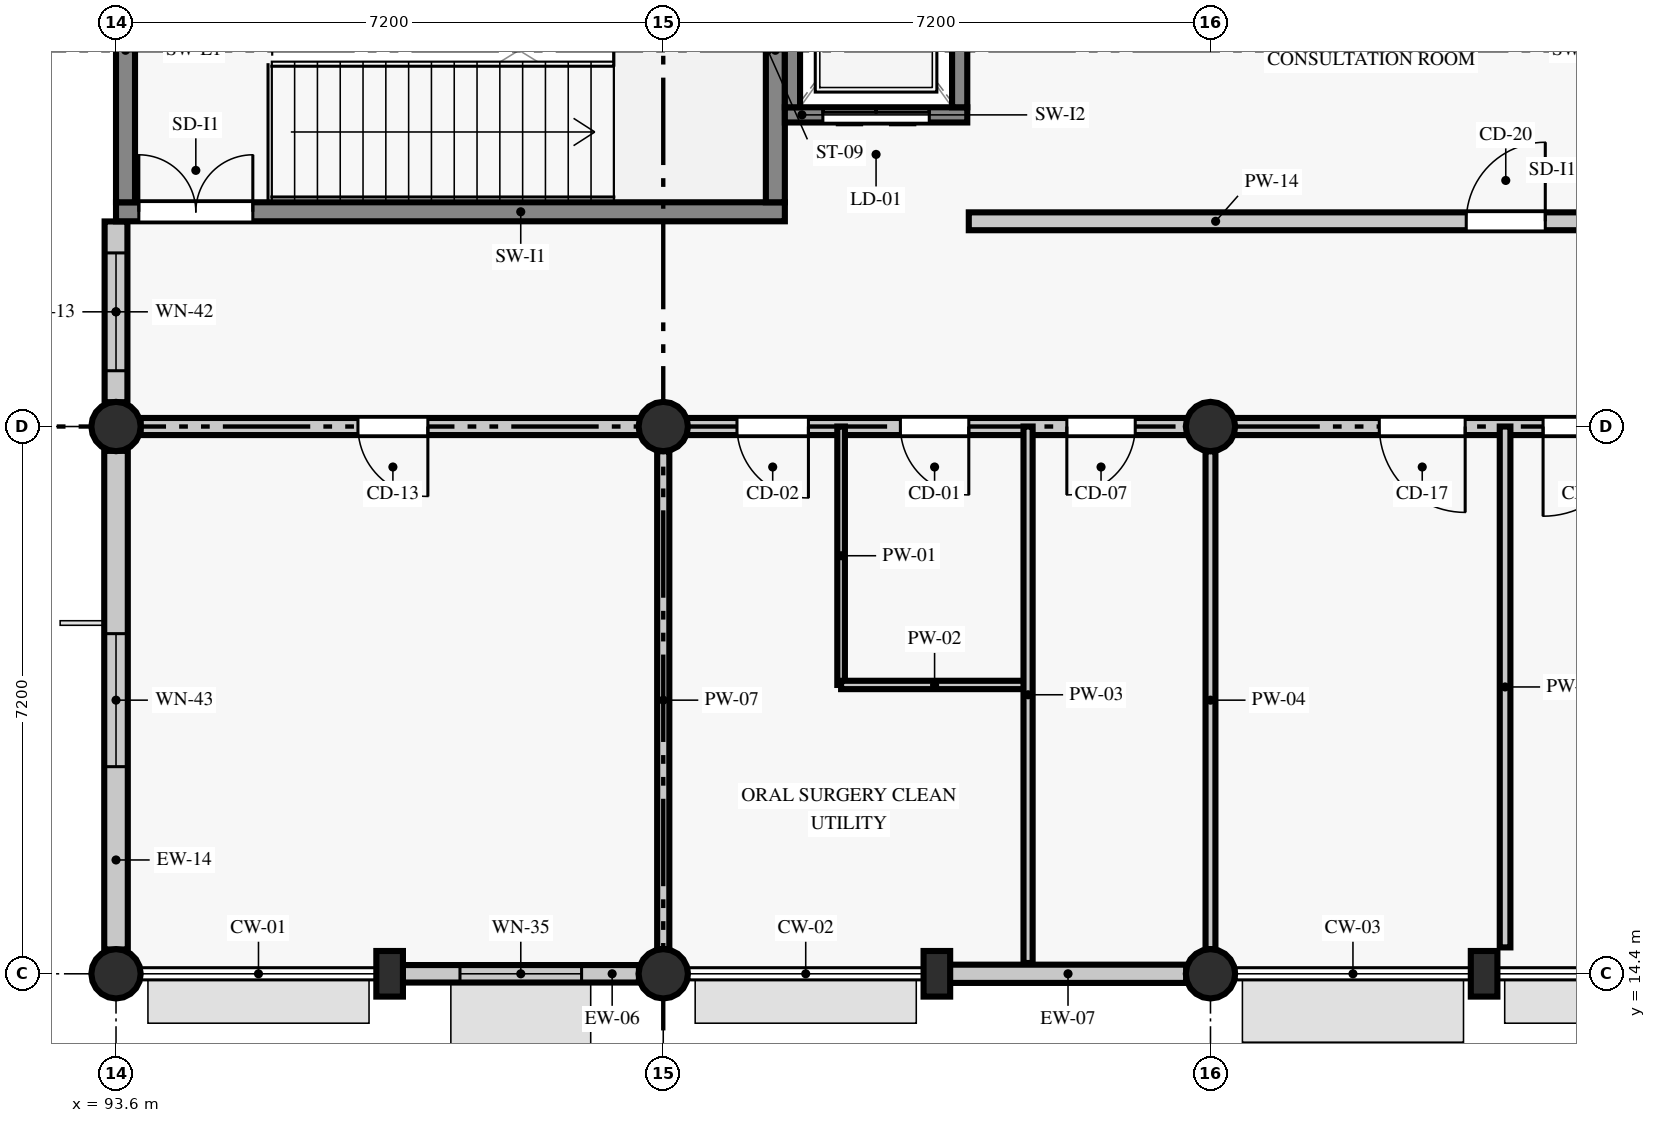
"""IFC4 building model, lengths in metres.
Left out: names, types, materials, properties, quantities, classifications, styles, units other than length and angle.
Written with IfcOpenShell. Run it as: python <this file> out.ifc"""

import sys

from ifc_helpers import new_model, si_unit, direction, frame, frame_2d, origin, origin_2d, place, context, subcontext, project, spatial, rectangle, circle, extrude, element, fill, save


model = new_model("IFC4")
c1 = context("Model", 3, precision=1e-05, world=origin(), true_north=direction((0.0, 1.0)))
c2 = subcontext(c1, "Body", "Model", "MODEL_VIEW")
j1 = project(units=[si_unit("LENGTHUNIT", "METRE"), si_unit("PLANEANGLEUNIT", "RADIAN")], contexts=[c1])
p1 = place(None, origin())
s1 = spatial("IfcSite", under=j1, at=p1, CompositionType="ELEMENT")
p2 = place(p1, origin())
s2 = spatial("IfcBuilding", under=s1, at=p2, CompositionType="ELEMENT")
p3 = place(p2, frame((0.0, 0.0, 4.8)))
s3 = spatial("IfcBuildingStorey", under=s2, at=p3, CompositionType="ELEMENT", Elevation=4.8)
for number, where, z_axis, x_axis in (
    (1, (93.6, 14.4, 0.0), (0.0, 0.0, 1.0), (1.0, 0.0, 0.0)),
    (2, (93.6, 21.6, 0.0), (0.0, 0.0, 1.0), (1.0, 0.0, 0.0)),
    (3, (100.8, 14.4, 0.0), (0.0, 0.0, 1.0), (1.0, 0.0, 0.0)),
    (4, (100.8, 21.6, 0.0), (0.0, 0.0, 1.0), (1.0, 0.0, 0.0)),
    (5, (108.0, 14.4, 0.0), (0.0, 0.0, 1.0), (1.0, 0.0, 0.0)),
    (6, (108.0, 21.6, 0.0), (0.0, 0.0, 1.0), (1.0, 0.0, 0.0)),
):
    element("IfcColumn", number, at=place(p3, frame(where, z_axis=z_axis, x_axis=x_axis)), inside=s3, PredefinedType="COLUMN", context=c2, shape_type="SweptSolid", body=[
        extrude(circle(Radius=0.325, at=origin_2d()), origin(), (0.0, 0.0, 1.0), 4.49),
    ])
for number, where, z_axis, x_axis in (
    (7, (97.2, 14.4, 0.0), (0.0, 0.0, 1.0), (1.0, 0.0, 0.0)),
    (8, (104.4, 14.4, 0.0), (0.0, 0.0, 1.0), (1.0, 0.0, 0.0)),
    (9, (111.6, 14.4, 0.0), (0.0, 0.0, 1.0), (1.0, 0.0, 0.0)),
):
    element("IfcColumn", number, at=place(p3, frame(where, z_axis=z_axis, x_axis=x_axis)), inside=s3, PredefinedType="PILASTER", context=c2, shape_type="SweptSolid", body=[
        extrude(rectangle(XDim=0.35, YDim=0.6, at=origin_2d()), origin(), (0.0, 0.0, 1.0), 4.49),
    ])
p4 = place(p3, frame((97.371, 14.4, 0.0), z_axis=(0.0, 0.0, 1.0), x_axis=(1.0, 0.0, 0.0)))
e10 = element("IfcWall", 10, at=p4, inside=s3, PredefinedType="STANDARD", context=c2, shape_type="SweptSolid", body=[
    extrude(rectangle(XDim=3.109, YDim=0.23, at=frame_2d((1.554, 0.0))), origin(), (0.0, 0.0, 1.0), 3.84),
])
p5 = place(p4, frame((0.754, 0.0, 0.9)))
e11 = element("IfcOpeningElement", 11, at=p5, cuts=e10, PredefinedType="OPENING", context=c2, shape_type="SweptSolid", body=[
    extrude(rectangle(XDim=1.6, YDim=1.66, at=frame_2d((0.8, 0.83))), frame((0.0, 0.125, 0.0), z_axis=(0.0, -1.0, 0.0), x_axis=(1.0, 0.0, 0.0)), (0.0, 0.0, 1.0), 0.25),
])
p6 = place(p3, frame((104.571, 14.4, 0.0), z_axis=(0.0, 0.0, 1.0), x_axis=(1.0, 0.0, 0.0)))
e12 = element("IfcWall", 12, at=p6, inside=s3, PredefinedType="STANDARD", context=c2, shape_type="SweptSolid", body=[
    extrude(rectangle(XDim=3.109, YDim=0.24, at=frame_2d((1.554, 0.0))), origin(), (0.0, 0.0, 1.0), 3.84),
])
p7 = place(p3, frame((93.6, 24.298, 0.0), z_axis=(0.0, 0.0, 1.0), x_axis=(0.0, -1.0, 0.0)))
e13 = element("IfcWall", 13, at=p7, inside=s3, PredefinedType="STANDARD", context=c2, shape_type="SweptSolid", body=[
    extrude(rectangle(XDim=2.378, YDim=0.3, at=frame_2d((1.189, 0.0))), origin(), (0.0, 0.0, 1.0), 4.49),
])
p8 = place(p7, frame((0.414, 0.0, 0.9)))
e14 = element("IfcOpeningElement", 14, at=p8, cuts=e13, PredefinedType="OPENING", context=c2, shape_type="SweptSolid", body=[
    extrude(rectangle(XDim=1.55, YDim=1.78, at=frame_2d((0.775, 0.89))), frame((0.0, 0.16, 0.0), z_axis=(0.0, -1.0, 0.0), x_axis=(1.0, 0.0, 0.0)), (0.0, 0.0, 1.0), 0.32),
])
p9 = place(p3, frame((93.6, 21.28, 0.0), z_axis=(0.0, 0.0, 1.0), x_axis=(0.0, -1.0, 0.0)))
e15 = element("IfcWall", 15, at=p9, inside=s3, PredefinedType="STANDARD", context=c2, shape_type="SweptSolid", body=[
    extrude(rectangle(XDim=6.56, YDim=0.31, at=frame_2d((3.28, 0.0))), origin(), (0.0, 0.0, 1.0), 3.84),
])
p10 = place(p9, frame((2.405, 0.0, 0.9)))
e16 = element("IfcOpeningElement", 16, at=p10, cuts=e15, PredefinedType="OPENING", context=c2, shape_type="SweptSolid", body=[
    extrude(rectangle(XDim=1.75, YDim=1.78, at=frame_2d((0.875, 0.89))), frame((0.0, 0.165, 0.0), z_axis=(0.0, -1.0, 0.0), x_axis=(1.0, 0.0, 0.0)), (0.0, 0.0, 1.0), 0.33),
])
p11 = place(p3, frame((93.6, 24.425, 0.0), z_axis=(0.0, 0.0, 1.0), x_axis=(1.0, 0.0, 0.0)))
e17 = element("IfcWall", 17, at=p11, inside=s3, PredefinedType="SHEAR", context=c2, shape_type="SweptSolid", body=[
    extrude(rectangle(XDim=8.8, YDim=0.25, at=frame_2d((4.4, 0.0))), origin(), (0.0, 0.0, 1.0), 4.49),
])
p12 = place(p11, frame((0.3, 0.0, 0.0)))
e18 = element("IfcOpeningElement", 18, at=p12, cuts=e17, PredefinedType="OPENING", context=c2, shape_type="SweptSolid", body=[
    extrude(rectangle(XDim=1.5, YDim=2.15, at=frame_2d((0.75, 1.075))), frame((0.0, 0.135, 0.0), z_axis=(0.0, -1.0, 0.0), x_axis=(1.0, 0.0, 0.0)), (0.0, 0.0, 1.0), 0.27),
])
for number, where, z_axis, x_axis in (
    (19, (102.275, 24.55, 0.0), (0.0, 0.0, 1.0), (0.0, 1.0, 0.0)),
    (20, (93.725, 28.55, 0.0), (0.0, 0.0, 1.0), (0.0, -1.0, 0.0)),
):
    element("IfcWall", number, at=place(p3, frame(where, z_axis=z_axis, x_axis=x_axis)), inside=s3, PredefinedType="SHEAR", context=c2, shape_type="SweptSolid", body=[
        extrude(rectangle(XDim=4.0, YDim=0.25, at=frame_2d((2.0, 0.0))), origin(), (0.0, 0.0, 1.0), 4.49),
    ])
p13 = place(p3, frame((102.4, 25.7, 0.0), z_axis=(0.0, 0.0, 1.0), x_axis=(1.0, 0.0, 0.0)))
e21 = element("IfcWall", 21, at=p13, inside=s3, PredefinedType="SHEAR", context=c2, shape_type="SweptSolid", body=[
    extrude(rectangle(XDim=2.4, YDim=0.2, at=frame_2d((1.2, 0.0))), origin(), (0.0, 0.0, 1.0), 4.49),
])
p14 = place(p13, frame((0.5, 0.0, 0.0)))
e22 = element("IfcOpeningElement", 22, at=p14, cuts=e21, PredefinedType="OPENING", context=c2, shape_type="SweptSolid", body=[
    extrude(rectangle(XDim=1.4, YDim=2.15, at=frame_2d((0.7, 1.075))), frame((0.0, 0.11, 0.0), z_axis=(0.0, -1.0, 0.0), x_axis=(1.0, 0.0, 0.0)), (0.0, 0.0, 1.0), 0.22),
])
for number, where, z_axis, x_axis in (
    (23, (104.7, 25.8, 0.0), (0.0, 0.0, 1.0), (0.0, 1.0, 0.0)),
    (24, (102.5, 28.6, 0.0), (0.0, 0.0, 1.0), (0.0, -1.0, 0.0)),
):
    element("IfcWall", number, at=place(p3, frame(where, z_axis=z_axis, x_axis=x_axis)), inside=s3, PredefinedType="SHEAR", context=c2, shape_type="SweptSolid", body=[
        extrude(rectangle(XDim=2.8, YDim=0.2, at=frame_2d((1.4, 0.0))), origin(), (0.0, 0.0, 1.0), 4.49),
    ])
p15 = place(p3, frame((93.925, 21.6, 0.0), z_axis=(0.0, 0.0, 1.0), x_axis=(1.0, 0.0, 0.0)))
e25 = element("IfcWall", 25, at=p15, inside=s3, PredefinedType="PARTITIONING", context=c2, shape_type="SweptSolid", body=[
    extrude(rectangle(XDim=28.15, YDim=0.225, at=frame_2d((14.075, 0.0))), origin(), (0.0, 0.0, 1.0), 3.79),
])
p16 = place(p15, frame((2.858, 0.0, 0.0)))
e26 = element("IfcOpeningElement", 26, at=p16, cuts=e25, PredefinedType="OPENING", context=c2, shape_type="SweptSolid", body=[
    extrude(rectangle(XDim=0.92, YDim=2.18, at=frame_2d((0.46, 1.09))), frame((0.0, 0.123, 0.0), z_axis=(0.0, -1.0, 0.0), x_axis=(1.0, 0.0, 0.0)), (0.0, 0.0, 1.0), 0.245),
])
p17 = place(p15, frame((7.845, 0.0, 0.0)))
e27 = element("IfcOpeningElement", 27, at=p17, cuts=e25, PredefinedType="OPENING", context=c2, shape_type="SweptSolid", body=[
    extrude(rectangle(XDim=0.94, YDim=2.08, at=frame_2d((0.47, 1.04))), frame((0.0, 0.123, 0.0), z_axis=(0.0, -1.0, 0.0), x_axis=(1.0, 0.0, 0.0)), (0.0, 0.0, 1.0), 0.245),
])
p18 = place(p15, frame((9.995, 0.0, 0.0)))
e28 = element("IfcOpeningElement", 28, at=p18, cuts=e25, PredefinedType="OPENING", context=c2, shape_type="SweptSolid", body=[
    extrude(rectangle(XDim=0.9, YDim=2.08, at=frame_2d((0.45, 1.04))), frame((0.0, 0.123, 0.0), z_axis=(0.0, -1.0, 0.0), x_axis=(1.0, 0.0, 0.0)), (0.0, 0.0, 1.0), 0.245),
])
p19 = place(p15, frame((12.185, 0.0, 0.0)))
e29 = element("IfcOpeningElement", 29, at=p19, cuts=e25, PredefinedType="OPENING", context=c2, shape_type="SweptSolid", body=[
    extrude(rectangle(XDim=0.9, YDim=2.13, at=frame_2d((0.45, 1.065))), frame((0.0, 0.123, 0.0), z_axis=(0.0, -1.0, 0.0), x_axis=(1.0, 0.0, 0.0)), (0.0, 0.0, 1.0), 0.245),
])
p20 = place(p15, frame((16.296, 0.0, 0.0)))
e30 = element("IfcOpeningElement", 30, at=p20, cuts=e25, PredefinedType="OPENING", context=c2, shape_type="SweptSolid", body=[
    extrude(rectangle(XDim=1.13, YDim=2.18, at=frame_2d((0.565, 1.09))), frame((0.0, 0.123, 0.0), z_axis=(0.0, -1.0, 0.0), x_axis=(1.0, 0.0, 0.0)), (0.0, 0.0, 1.0), 0.245),
])
p21 = place(p15, frame((18.451, 0.0, 0.0)))
e31 = element("IfcOpeningElement", 31, at=p21, cuts=e25, PredefinedType="OPENING", context=c2, shape_type="SweptSolid", body=[
    extrude(rectangle(XDim=1.18, YDim=2.18, at=frame_2d((0.59, 1.09))), frame((0.0, 0.123, 0.0), z_axis=(0.0, -1.0, 0.0), x_axis=(1.0, 0.0, 0.0)), (0.0, 0.0, 1.0), 0.245),
])
p22 = place(p15, frame((24.595, 0.0, 0.0)))
e32 = element("IfcOpeningElement", 32, at=p22, cuts=e25, PredefinedType="OPENING", context=c2, shape_type="SweptSolid", body=[
    extrude(rectangle(XDim=0.96, YDim=2.23, at=frame_2d((0.48, 1.115))), frame((0.0, 0.123, 0.0), z_axis=(0.0, -1.0, 0.0), x_axis=(1.0, 0.0, 0.0)), (0.0, 0.0, 1.0), 0.245),
])
p23 = place(p3, frame((100.8, 14.725, 0.0), z_axis=(0.0, 0.0, 1.0), x_axis=(0.0, 1.0, 0.0)))
e33 = element("IfcWall", 33, at=p23, inside=s3, PredefinedType="PARTITIONING", context=c2, shape_type="SweptSolid", body=[
    extrude(rectangle(XDim=6.55, YDim=0.16, at=frame_2d((3.275, 0.0))), origin(), (0.0, 0.0, 1.0), 3.94),
])
p24 = place(p3, frame((103.14, 18.2, 0.0), z_axis=(0.0, 0.0, 1.0), x_axis=(0.0, 1.0, 0.0)))
e34 = element("IfcWall", 34, at=p24, inside=s3, PredefinedType="PARTITIONING", context=c2, shape_type="SweptSolid", body=[
    extrude(rectangle(XDim=3.4, YDim=0.1, at=frame_2d((1.7, 0.0))), origin(), (0.0, 0.0, 1.0), 3.79),
])
p25 = place(p3, frame((103.14, 18.2, 0.0), z_axis=(0.0, 0.0, 1.0), x_axis=(1.0, 0.0, 0.0)))
e35 = element("IfcWall", 35, at=p25, inside=s3, PredefinedType="PARTITIONING", context=c2, shape_type="SweptSolid", body=[
    extrude(rectangle(XDim=2.46, YDim=0.11, at=frame_2d((1.23, 0.0))), origin(), (0.0, 0.0, 1.0), 4.49),
])
p26 = place(p3, frame((105.6, 14.542, 0.0), z_axis=(0.0, 0.0, 1.0), x_axis=(0.0, 1.0, 0.0)))
e36 = element("IfcWall", 36, at=p26, inside=s3, PredefinedType="PARTITIONING", context=c2, shape_type="SweptSolid", body=[
    extrude(rectangle(XDim=7.058, YDim=0.12, at=frame_2d((3.529, 0.0))), origin(), (0.0, 0.0, 1.0), 3.79),
])
p27 = place(p3, frame((108.0, 14.725, 0.0), z_axis=(0.0, 0.0, 1.0), x_axis=(0.0, 1.0, 0.0)))
e37 = element("IfcWall", 37, at=p27, inside=s3, PredefinedType="PARTITIONING", context=c2, shape_type="SweptSolid", body=[
    extrude(rectangle(XDim=6.55, YDim=0.13, at=frame_2d((3.275, 0.0))), origin(), (0.0, 0.0, 1.0), 3.94),
])
p28 = place(p3, frame((111.876, 14.747, 0.0), z_axis=(0.0, 0.0, 1.0), x_axis=(0.0, 1.0, 0.0)))
e38 = element("IfcWall", 38, at=p28, inside=s3, PredefinedType="PARTITIONING", context=c2, shape_type="SweptSolid", body=[
    extrude(rectangle(XDim=6.853, YDim=0.14, at=frame_2d((3.426, 0.0))), origin(), (0.0, 0.0, 1.0), 3.79),
])
p29 = place(p3, frame((104.82, 24.3, 0.0), z_axis=(0.0, 0.0, 1.0), x_axis=(1.0, 0.0, 0.0)))
e39 = element("IfcWall", 39, at=p29, inside=s3, PredefinedType="PARTITIONING", context=c2, shape_type="SweptSolid", body=[
    extrude(rectangle(XDim=8.76, YDim=0.235, at=frame_2d((4.38, 0.0))), origin(), (0.0, 0.0, 1.0), 3.94),
])
p30 = place(p29, frame((6.545, 0.0, 0.0)))
e40 = element("IfcOpeningElement", 40, at=p30, cuts=e39, PredefinedType="OPENING", context=c2, shape_type="SweptSolid", body=[
    extrude(rectangle(XDim=1.04, YDim=2.23, at=frame_2d((0.52, 1.115))), frame((0.0, 0.127, 0.0), z_axis=(0.0, -1.0, 0.0), x_axis=(1.0, 0.0, 0.0)), (0.0, 0.0, 1.0), 0.255),
])
p31 = place(p5, origin())
e41 = element("IfcWindow", 41, at=p31, inside=s3, PartitioningType="SINGLE_PANEL", PredefinedType="WINDOW", context=c2, shape_type="SweptSolid", body=[
    extrude(rectangle(XDim=1.6, YDim=1.66, at=frame_2d((0.8, 0.83))), frame((0.0, 0.03, 0.0), z_axis=(0.0, -1.0, 0.0), x_axis=(1.0, 0.0, 0.0)), (0.0, 0.0, 1.0), 0.06),
])
fill(e11, e41)
p32 = place(p8, origin())
e42 = element("IfcWindow", 42, at=p32, inside=s3, PartitioningType="SINGLE_PANEL", PredefinedType="WINDOW", context=c2, shape_type="SweptSolid", body=[
    extrude(rectangle(XDim=1.55, YDim=1.78, at=frame_2d((0.775, 0.89))), frame((0.0, 0.03, 0.0), z_axis=(0.0, -1.0, 0.0), x_axis=(1.0, 0.0, 0.0)), (0.0, 0.0, 1.0), 0.06),
])
fill(e14, e42)
p33 = place(p10, origin())
e43 = element("IfcWindow", 43, at=p33, inside=s3, PartitioningType="SINGLE_PANEL", PredefinedType="WINDOW", context=c2, shape_type="SweptSolid", body=[
    extrude(rectangle(XDim=1.75, YDim=1.78, at=frame_2d((0.875, 0.89))), frame((0.0, 0.03, 0.0), z_axis=(0.0, -1.0, 0.0), x_axis=(1.0, 0.0, 0.0)), (0.0, 0.0, 1.0), 0.06),
])
fill(e16, e43)
p34 = place(p12, origin())
e44 = element("IfcDoor", 44, at=p34, inside=s3, OperationType="DOUBLE_DOOR_SINGLE_SWING", PredefinedType="DOOR", context=c2, shape_type="SweptSolid", body=[
    extrude(rectangle(XDim=1.5, YDim=2.15, at=frame_2d((0.75, 1.075))), frame((0.0, 0.025, 0.0), z_axis=(0.0, -1.0, 0.0), x_axis=(1.0, 0.0, 0.0)), (0.0, 0.0, 1.0), 0.05),
])
fill(e18, e44)
p35 = place(p14, frame((1.4, 0.0, 0.0), z_axis=(0.0, 0.0, 1.0), x_axis=(-1.0, 0.0, 0.0)))
e45 = element("IfcDoor", 45, at=p35, inside=s3, OperationType="DOUBLE_DOOR_SLIDING", PredefinedType="DOOR", context=c2, shape_type="SweptSolid", body=[
    extrude(rectangle(XDim=1.4, YDim=2.15, at=frame_2d((0.7, 1.075))), frame((0.0, 0.025, 0.0), z_axis=(0.0, -1.0, 0.0), x_axis=(1.0, 0.0, 0.0)), (0.0, 0.0, 1.0), 0.05),
])
fill(e22, e45)
p36 = place(p16, frame((0.92, 0.0, 0.0), z_axis=(0.0, 0.0, 1.0), x_axis=(-1.0, 0.0, 0.0)))
e46 = element("IfcDoor", 46, at=p36, inside=s3, OperationType="SINGLE_SWING_LEFT", PredefinedType="DOOR", context=c2, shape_type="SweptSolid", body=[
    extrude(rectangle(XDim=0.92, YDim=2.18, at=frame_2d((0.46, 1.09))), frame((0.0, 0.025, 0.0), z_axis=(0.0, -1.0, 0.0), x_axis=(1.0, 0.0, 0.0)), (0.0, 0.0, 1.0), 0.05),
])
fill(e26, e46)
p37 = place(p17, frame((0.94, 0.0, 0.0), z_axis=(0.0, 0.0, 1.0), x_axis=(-1.0, 0.0, 0.0)))
e47 = element("IfcDoor", 47, at=p37, inside=s3, OperationType="SINGLE_SWING_LEFT", PredefinedType="DOOR", context=c2, shape_type="SweptSolid", body=[
    extrude(rectangle(XDim=0.94, YDim=2.08, at=frame_2d((0.47, 1.04))), frame((0.0, 0.025, 0.0), z_axis=(0.0, -1.0, 0.0), x_axis=(1.0, 0.0, 0.0)), (0.0, 0.0, 1.0), 0.05),
])
fill(e27, e47)
p38 = place(p18, frame((0.9, 0.0, 0.0), z_axis=(0.0, 0.0, 1.0), x_axis=(-1.0, 0.0, 0.0)))
e48 = element("IfcDoor", 48, at=p38, inside=s3, OperationType="SINGLE_SWING_LEFT", PredefinedType="DOOR", context=c2, shape_type="SweptSolid", body=[
    extrude(rectangle(XDim=0.9, YDim=2.08, at=frame_2d((0.45, 1.04))), frame((0.0, 0.025, 0.0), z_axis=(0.0, -1.0, 0.0), x_axis=(1.0, 0.0, 0.0)), (0.0, 0.0, 1.0), 0.05),
])
fill(e28, e48)
p39 = place(p19, frame((0.9, 0.0, 0.0), z_axis=(0.0, 0.0, 1.0), x_axis=(-1.0, 0.0, 0.0)))
e49 = element("IfcDoor", 49, at=p39, inside=s3, OperationType="SINGLE_SWING_RIGHT", PredefinedType="DOOR", context=c2, shape_type="SweptSolid", body=[
    extrude(rectangle(XDim=0.9, YDim=2.13, at=frame_2d((0.45, 1.065))), frame((0.0, 0.025, 0.0), z_axis=(0.0, -1.0, 0.0), x_axis=(1.0, 0.0, 0.0)), (0.0, 0.0, 1.0), 0.05),
])
fill(e29, e49)
p40 = place(p20, frame((1.13, 0.0, 0.0), z_axis=(0.0, 0.0, 1.0), x_axis=(-1.0, 0.0, 0.0)))
e50 = element("IfcDoor", 50, at=p40, inside=s3, OperationType="SINGLE_SWING_LEFT", PredefinedType="DOOR", context=c2, shape_type="SweptSolid", body=[
    extrude(rectangle(XDim=1.13, YDim=2.18, at=frame_2d((0.565, 1.09))), frame((0.0, 0.025, 0.0), z_axis=(0.0, -1.0, 0.0), x_axis=(1.0, 0.0, 0.0)), (0.0, 0.0, 1.0), 0.05),
])
fill(e30, e50)
p41 = place(p21, frame((1.18, 0.0, 0.0), z_axis=(0.0, 0.0, 1.0), x_axis=(-1.0, 0.0, 0.0)))
e51 = element("IfcDoor", 51, at=p41, inside=s3, OperationType="SINGLE_SWING_RIGHT", PredefinedType="DOOR", context=c2, shape_type="SweptSolid", body=[
    extrude(rectangle(XDim=1.18, YDim=2.18, at=frame_2d((0.59, 1.09))), frame((0.0, 0.025, 0.0), z_axis=(0.0, -1.0, 0.0), x_axis=(1.0, 0.0, 0.0)), (0.0, 0.0, 1.0), 0.05),
])
fill(e31, e51)
p42 = place(p30, origin())
e52 = element("IfcDoor", 52, at=p42, inside=s3, OperationType="SINGLE_SWING_RIGHT", PredefinedType="DOOR", context=c2, shape_type="SweptSolid", body=[
    extrude(rectangle(XDim=1.04, YDim=2.23, at=frame_2d((0.52, 1.115))), frame((0.0, 0.025, 0.0), z_axis=(0.0, -1.0, 0.0), x_axis=(1.0, 0.0, 0.0)), (0.0, 0.0, 1.0), 0.05),
])
fill(e40, e52)
save(model, sys.argv[1])
